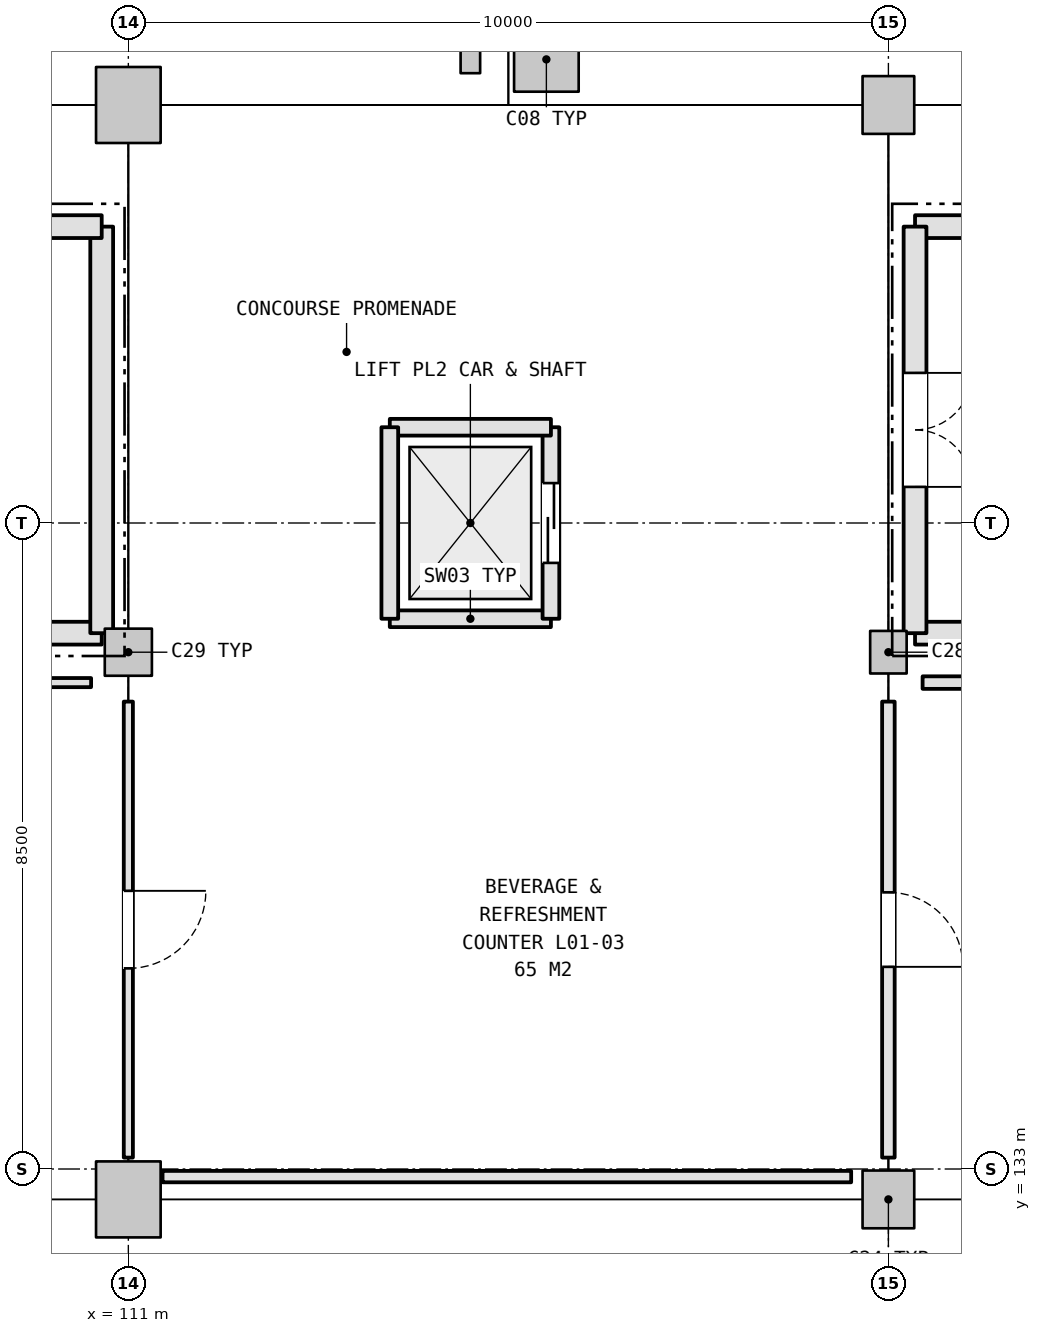
"""IFC4 building model, lengths in metres.
Left out: names, types, materials, properties, quantities, classifications, styles, units other than length and angle.
Written with IfcOpenShell. Run it as: python <this file> out.ifc"""

import sys

from ifc_helpers import new_model, si_unit, direction, frame, frame_2d, origin, origin_2d, place, context, subcontext, project, spatial, rectangle, i_section, extrude, element, fill, save


model = new_model("IFC4")
c1 = context("Model", 3, precision=1e-05, world=origin(), true_north=direction((0.0, 1.0)))
c2 = subcontext(c1, "Body", "Model", "MODEL_VIEW")
j1 = project(units=[si_unit("LENGTHUNIT", "METRE"), si_unit("PLANEANGLEUNIT", "RADIAN")], contexts=[c1])
p1 = place(None, origin())
s1 = spatial("IfcSite", under=j1, at=p1, CompositionType="ELEMENT")
p2 = place(p1, origin())
s2 = spatial("IfcBuilding", under=s1, at=p2, CompositionType="ELEMENT")
p3 = place(p2, frame((0.0, 0.0, 5.4)))
s3 = spatial("IfcBuildingStorey", under=s2, at=p3, CompositionType="ELEMENT", Elevation=5.4)
p4 = place(p3, frame((121.0, 132.6, 0.0), z_axis=(0.0, 0.0, 1.0), x_axis=(1.0, 0.0, 0.0)))
e1 = element("IfcColumn", 1, at=p4, inside=s3, PredefinedType="COLUMN", context=c2, shape_type="SweptSolid", body=[
    extrude(rectangle(XDim=0.68, YDim=0.76, at=origin_2d()), origin(), (0.0, 0.0, 1.0), 5.4),
])
p5 = place(p3, frame((121.0, 139.8, 0.0), z_axis=(0.0, 0.0, 1.0), x_axis=(1.0, 0.0, 0.0)))
e2 = element("IfcColumn", 2, at=p5, inside=s3, PredefinedType="COLUMN", context=c2, shape_type="SweptSolid", body=[
    extrude(rectangle(XDim=0.48, YDim=0.56, at=origin_2d()), origin(), (0.0, 0.0, 1.0), 5.4),
])
p6 = place(p3, frame((121.0, 147.0, 0.0), z_axis=(0.0, 0.0, 1.0), x_axis=(1.0, 0.0, 0.0)))
e3 = element("IfcColumn", 3, at=p6, inside=s3, PredefinedType="COLUMN", context=c2, shape_type="SweptSolid", body=[
    extrude(rectangle(XDim=0.68, YDim=0.76, at=origin_2d()), origin(), (0.0, 0.0, 1.0), 5.4),
])
p7 = place(p3, frame((111.0, 132.6, 0.0), z_axis=(0.0, 0.0, 1.0), x_axis=(1.0, 0.0, 0.0)))
e4 = element("IfcColumn", 4, at=p7, inside=s3, PredefinedType="COLUMN", context=c2, shape_type="SweptSolid", body=[
    extrude(rectangle(XDim=0.85, YDim=1.0, at=origin_2d()), origin(), (0.0, 0.0, 1.0), 5.4),
])
p8 = place(p3, frame((111.0, 139.8, 0.0), z_axis=(0.0, 0.0, 1.0), x_axis=(1.0, 0.0, 0.0)))
e5 = element("IfcColumn", 5, at=p8, inside=s3, PredefinedType="COLUMN", context=c2, shape_type="SweptSolid", body=[
    extrude(rectangle(XDim=0.62, YDim=0.62, at=origin_2d()), origin(), (0.0, 0.0, 1.0), 5.4),
])
p9 = place(p3, frame((111.0, 147.0, 0.0), z_axis=(0.0, 0.0, 1.0), x_axis=(1.0, 0.0, 0.0)))
e6 = element("IfcColumn", 6, at=p9, inside=s3, PredefinedType="COLUMN", context=c2, shape_type="SweptSolid", body=[
    extrude(rectangle(XDim=0.85, YDim=1.0, at=origin_2d()), origin(), (0.0, 0.0, 1.0), 5.4),
])
p10 = place(p3, frame((116.5, 147.6, 0.0), z_axis=(0.0, 0.0, 1.0), x_axis=(1.0, 0.0, 0.0)))
e7 = element("IfcColumn", 7, at=p10, inside=s3, PredefinedType="COLUMN", context=c2, shape_type="SweptSolid", body=[
    extrude(rectangle(XDim=0.85, YDim=0.85, at=origin_2d()), origin(), (0.0, 0.0, 1.0), 5.4),
])
p11 = place(p3, frame((115.5, 147.6, 0.0), z_axis=(0.0, 0.0, 1.0), x_axis=(1.0, 0.0, 0.0)))
e8 = element("IfcColumn", 8, at=p11, inside=s3, PredefinedType="COLUMN", context=c2, shape_type="SweptSolid", body=[
    extrude(i_section(OverallWidth=0.257, OverallDepth=0.363, WebThickness=0.013, FlangeThickness=0.022, FilletRadius=0.015, at=origin_2d()), origin(), (0.0, 0.0, 1.0), 5.4),
])
for number, where, z_axis, x_axis in (
    (9, (121.35, 140.05, 0.0), (0.0, 0.0, 1.0), (1.0, 0.0, 0.0)),
    (10, (130.65, 145.4, 0.0), (0.0, 0.0, 1.0), (-1.0, 0.0, 0.0)),
):
    element("IfcWall", number, at=place(p3, frame(where, z_axis=z_axis, x_axis=x_axis)), inside=s3, PredefinedType="SHEAR", context=c2, shape_type="SweptSolid", body=[
        extrude(rectangle(XDim=9.299, YDim=0.3, at=frame_2d((4.65, 0.0))), origin(), (0.0, 0.0, 1.0), 5.14),
    ])
p12 = place(p3, frame((121.35, 145.4, 0.0), z_axis=(0.0, 0.0, 1.0), x_axis=(0.0, -1.0, 0.0)))
e11 = element("IfcWall", 11, at=p12, inside=s3, PredefinedType="SHEAR", context=c2, shape_type="SweptSolid", body=[
    extrude(rectangle(XDim=5.349, YDim=0.3, at=frame_2d((2.675, 0.0))), origin(), (0.0, 0.0, 1.0), 5.14),
])
p13 = place(p12, frame((1.925, 0.0, 0.0)))
e12 = element("IfcOpeningElement", 12, at=p13, cuts=e11, PredefinedType="OPENING", context=c2, shape_type="SweptSolid", body=[
    extrude(rectangle(XDim=1.5, YDim=2.2, at=frame_2d((0.75, 1.1))), frame((0.0, 0.16, 0.0), z_axis=(0.0, -1.0, 0.0), x_axis=(1.0, 0.0, 0.0)), (0.0, 0.0, 1.0), 0.32),
])
p14 = place(p3, frame((101.35, 140.05, 0.0), z_axis=(0.0, 0.0, 1.0), x_axis=(1.0, 0.0, 0.0)))
e13 = element("IfcWall", 13, at=p14, inside=s3, PredefinedType="SHEAR", context=c2, shape_type="SweptSolid", body=[
    extrude(rectangle(XDim=9.299, YDim=0.3, at=frame_2d((4.65, 0.0))), origin(), (0.0, 0.0, 1.0), 5.14),
])
p15 = place(p3, frame((110.65, 140.05, 0.0), z_axis=(0.0, 0.0, 1.0), x_axis=(0.0, 1.0, 0.0)))
e14 = element("IfcWall", 14, at=p15, inside=s3, PredefinedType="SHEAR", context=c2, shape_type="SweptSolid", body=[
    extrude(rectangle(XDim=5.349, YDim=0.3, at=frame_2d((2.675, 0.0))), origin(), (0.0, 0.0, 1.0), 5.14),
])
p16 = place(p3, frame((110.65, 145.4, 0.0), z_axis=(0.0, 0.0, 1.0), x_axis=(-1.0, 0.0, 0.0)))
e15 = element("IfcWall", 15, at=p16, inside=s3, PredefinedType="SHEAR", context=c2, shape_type="SweptSolid", body=[
    extrude(rectangle(XDim=9.299, YDim=0.3, at=frame_2d((4.65, 0.0))), origin(), (0.0, 0.0, 1.0), 5.14),
])
p17 = place(p3, frame((114.44, 140.24, 0.0), z_axis=(0.0, 0.0, 1.0), x_axis=(1.0, 0.0, 0.0)))
e16 = element("IfcWall", 16, at=p17, inside=s3, PredefinedType="SHEAR", context=c2, shape_type="SweptSolid", body=[
    extrude(rectangle(XDim=2.12, YDim=0.22, at=frame_2d((1.06, 0.0))), origin(), (0.0, 0.0, 1.0), 5.14),
])
p18 = place(p3, frame((116.56, 140.24, 0.0), z_axis=(0.0, 0.0, 1.0), x_axis=(0.0, 1.0, 0.0)))
e17 = element("IfcWall", 17, at=p18, inside=s3, PredefinedType="SHEAR", context=c2, shape_type="SweptSolid", body=[
    extrude(rectangle(XDim=2.52, YDim=0.22, at=frame_2d((1.26, 0.0))), origin(), (0.0, 0.0, 1.0), 5.14),
])
p19 = place(p18, frame((0.735, 0.0, 0.0)))
e18 = element("IfcOpeningElement", 18, at=p19, cuts=e17, PredefinedType="OPENING", context=c2, shape_type="SweptSolid", body=[
    extrude(rectangle(XDim=1.05, YDim=2.15, at=frame_2d((0.525, 1.075))), frame((0.0, 0.12, 0.0), z_axis=(0.0, -1.0, 0.0), x_axis=(1.0, 0.0, 0.0)), (0.0, 0.0, 1.0), 0.24),
])
p20 = place(p3, frame((116.56, 142.76, 0.0), z_axis=(0.0, 0.0, 1.0), x_axis=(-1.0, 0.0, 0.0)))
e19 = element("IfcWall", 19, at=p20, inside=s3, PredefinedType="SHEAR", context=c2, shape_type="SweptSolid", body=[
    extrude(rectangle(XDim=2.12, YDim=0.22, at=frame_2d((1.06, 0.0))), origin(), (0.0, 0.0, 1.0), 5.14),
])
p21 = place(p3, frame((114.44, 142.76, 0.0), z_axis=(0.0, 0.0, 1.0), x_axis=(0.0, -1.0, 0.0)))
e20 = element("IfcWall", 20, at=p21, inside=s3, PredefinedType="SHEAR", context=c2, shape_type="SweptSolid", body=[
    extrude(rectangle(XDim=2.52, YDim=0.22, at=frame_2d((1.26, 0.0))), origin(), (0.0, 0.0, 1.0), 5.14),
])
p22 = place(p3, frame((121.0, 133.15, 0.0), z_axis=(0.0, 0.0, 1.0), x_axis=(0.0, 1.0, 0.0)))
e21 = element("IfcWall", 21, at=p22, inside=s3, PredefinedType="PARTITIONING", context=c2, shape_type="SweptSolid", body=[
    extrude(rectangle(XDim=6.0, YDim=0.165, at=frame_2d((3.0, 0.0))), origin(), (0.0, 0.0, 1.0), 4.375),
])
p23 = place(p22, frame((2.51, 0.0, 0.0)))
e22 = element("IfcOpeningElement", 22, at=p23, cuts=e21, PredefinedType="OPENING", context=c2, shape_type="SweptSolid", body=[
    extrude(rectangle(XDim=0.98, YDim=2.15, at=frame_2d((0.49, 1.075))), frame((0.0, 0.093, 0.0), z_axis=(0.0, -1.0, 0.0), x_axis=(1.0, 0.0, 0.0)), (0.0, 0.0, 1.0), 0.185),
])
p24 = place(p3, frame((121.45, 139.4, 0.0), z_axis=(0.0, 0.0, 1.0), x_axis=(1.0, 0.0, 0.0)))
e23 = element("IfcWall", 23, at=p24, inside=s3, PredefinedType="PARTITIONING", context=c2, shape_type="SweptSolid", body=[
    extrude(rectangle(XDim=9.06, YDim=0.165, at=frame_2d((4.53, 0.0))), origin(), (0.0, 0.0, 1.0), 5.12),
])
p25 = place(p3, frame((111.0, 133.15, 0.0), z_axis=(0.0, 0.0, 1.0), x_axis=(0.0, 1.0, 0.0)))
e24 = element("IfcWall", 24, at=p25, inside=s3, PredefinedType="PARTITIONING", context=c2, shape_type="SweptSolid", body=[
    extrude(rectangle(XDim=6.0, YDim=0.12, at=frame_2d((3.0, 0.0))), origin(), (0.0, 0.0, 1.0), 4.365),
])
p26 = place(p25, frame((2.49, 0.0, 0.0)))
e25 = element("IfcOpeningElement", 25, at=p26, cuts=e24, PredefinedType="OPENING", context=c2, shape_type="SweptSolid", body=[
    extrude(rectangle(XDim=1.02, YDim=2.15, at=frame_2d((0.51, 1.075))), frame((0.0, 0.07, 0.0), z_axis=(0.0, -1.0, 0.0), x_axis=(1.0, 0.0, 0.0)), (0.0, 0.0, 1.0), 0.14),
])
p27 = place(p3, frame((120.51, 132.9, 0.0), z_axis=(0.0, 0.0, 1.0), x_axis=(-1.0, 0.0, 0.0)))
e26 = element("IfcWall", 26, at=p27, inside=s3, PredefinedType="PARTITIONING", context=c2, shape_type="SweptSolid", body=[
    extrude(rectangle(XDim=9.06, YDim=0.15, at=frame_2d((4.53, 0.0))), origin(), (0.0, 0.0, 1.0), 4.405),
])
p28 = place(p3, frame((101.45, 139.4, 0.0), z_axis=(0.0, 0.0, 1.0), x_axis=(1.0, 0.0, 0.0)))
e27 = element("IfcWall", 27, at=p28, inside=s3, PredefinedType="PARTITIONING", context=c2, shape_type="SweptSolid", body=[
    extrude(rectangle(XDim=9.06, YDim=0.12, at=frame_2d((4.53, 0.0))), origin(), (0.0, 0.0, 1.0), 5.12),
])
p29 = place(p13, origin())
e28 = element("IfcDoor", 28, at=p29, inside=s3, OperationType="DOUBLE_DOOR_SINGLE_SWING", PredefinedType="DOOR", context=c2, shape_type="SweptSolid", body=[
    extrude(rectangle(XDim=1.5, YDim=2.2, at=frame_2d((0.75, 1.1))), frame((0.0, 0.025, 0.0), z_axis=(0.0, -1.0, 0.0), x_axis=(1.0, 0.0, 0.0)), (0.0, 0.0, 1.0), 0.05),
])
fill(e12, e28)
p30 = place(p19, origin())
e29 = element("IfcDoor", 29, at=p30, inside=s3, OperationType="DOUBLE_DOOR_SLIDING", PredefinedType="DOOR", context=c2, shape_type="SweptSolid", body=[
    extrude(rectangle(XDim=1.05, YDim=2.15, at=frame_2d((0.525, 1.075))), frame((0.0, 0.025, 0.0), z_axis=(0.0, -1.0, 0.0), x_axis=(1.0, 0.0, 0.0)), (0.0, 0.0, 1.0), 0.05),
])
fill(e18, e29)
p31 = place(p23, frame((0.98, 0.0, 0.0), z_axis=(0.0, 0.0, 1.0), x_axis=(-1.0, 0.0, 0.0)))
e30 = element("IfcDoor", 30, at=p31, inside=s3, OperationType="SINGLE_SWING_LEFT", PredefinedType="DOOR", context=c2, shape_type="SweptSolid", body=[
    extrude(rectangle(XDim=0.98, YDim=2.15, at=frame_2d((0.49, 1.075))), frame((0.0, 0.025, 0.0), z_axis=(0.0, -1.0, 0.0), x_axis=(1.0, 0.0, 0.0)), (0.0, 0.0, 1.0), 0.05),
])
fill(e22, e30)
p32 = place(p26, frame((1.02, 0.0, 0.0), z_axis=(0.0, 0.0, 1.0), x_axis=(-1.0, 0.0, 0.0)))
e31 = element("IfcDoor", 31, at=p32, inside=s3, OperationType="SINGLE_SWING_RIGHT", PredefinedType="DOOR", context=c2, shape_type="SweptSolid", body=[
    extrude(rectangle(XDim=1.02, YDim=2.15, at=frame_2d((0.51, 1.075))), frame((0.0, 0.025, 0.0), z_axis=(0.0, -1.0, 0.0), x_axis=(1.0, 0.0, 0.0)), (0.0, 0.0, 1.0), 0.05),
])
fill(e25, e31)
save(model, sys.argv[1])
